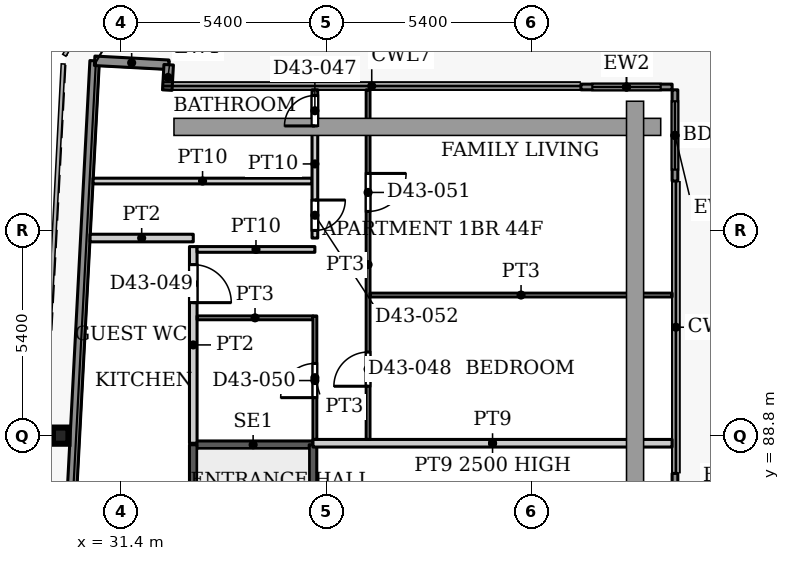
"""IFC4 building model, lengths in metres.
Left out: names, types, materials, properties, quantities, classifications, styles, units other than length and angle.
Written with IfcOpenShell. Run it as: python <this file> out.ifc"""

import sys

from ifc_helpers import new_model, si_unit, direction, frame, frame_2d, origin, origin_2d, place, context, subcontext, project, spatial, rectangle, i_section, extrude, source, transform, mapped, element, fill, save


model = new_model("IFC4")
c1 = context("Model", 3, precision=1e-05, world=origin(), true_north=direction((0.0, 1.0)))
c2 = subcontext(c1, "Body", "Model", "MODEL_VIEW")
j1 = project(units=[si_unit("LENGTHUNIT", "METRE"), si_unit("PLANEANGLEUNIT", "RADIAN")], contexts=[c1])
p1 = place(None, origin())
s1 = spatial("IfcSite", under=j1, at=p1, CompositionType="ELEMENT")
p2 = place(p1, origin())
s2 = spatial("IfcBuilding", under=s1, at=p2, CompositionType="ELEMENT")
p3 = place(p2, frame((0.0, 0.0, 187.7)))
s3 = spatial("IfcBuildingStorey", under=s2, at=p3, CompositionType="ELEMENT", Elevation=187.7)
p4 = place(p3, frame((29.811, 88.8, 0.0), z_axis=(0.0, 0.0, 1.0), x_axis=(1.0, 0.0, 0.0)))
e1 = element("IfcColumn", 1, at=p4, inside=s3, PredefinedType="COLUMN", context=c2, shape_type="SweptSolid", body=[
    extrude(i_section(OverallWidth=0.409, OverallDepth=0.425, WebThickness=0.033, FlangeThickness=0.052, FilletRadius=0.013, at=origin_2d()), origin(), (0.0, 0.0, 1.0), 3.9),
])
p5 = place(p3, frame((27.195, 31.969, 0.0), z_axis=(0.0, 0.0, 1.0), x_axis=(0.052554995867, 0.998618031286, 0.0)))
e2 = element("IfcWall", 2, at=p5, inside=s3, PredefinedType="SOLIDWALL", context=c2, shape_type="SweptSolid", body=[
    extrude(rectangle(XDim=66.787, YDim=0.25, at=frame_2d((33.394, 0.0))), origin(), (0.0, 0.0, 1.0), 3.75),
])
p6 = place(p3, frame((30.705, 98.664, 0.0), z_axis=(0.0, 0.0, 1.0), x_axis=(0.998577785791, -0.053314216913, 0.0)))
e3 = element("IfcWall", 3, at=p6, inside=s3, PredefinedType="SOLIDWALL", context=c2, shape_type="SweptSolid", body=[
    extrude(rectangle(XDim=1.951, YDim=0.25, at=frame_2d((0.975, 0.0))), origin(), (0.0, 0.0, 1.0), 3.75),
])
p7 = place(p3, frame((32.653, 98.56, 0.0), z_axis=(0.0, 0.0, 1.0), x_axis=(-0.054093451632, -0.998535877418, 0.0)))
e4 = element("IfcWall", 4, at=p7, inside=s3, PredefinedType="SOLIDWALL", context=c2, shape_type="SweptSolid", body=[
    extrude(rectangle(XDim=0.668, YDim=0.25, at=frame_2d((0.334, 0.0))), origin(), (0.0, 0.0, 1.0), 3.75),
])
p8 = place(p3, frame((43.5, 97.975, 0.0), z_axis=(0.0, 0.0, 1.0), x_axis=(1.0, 0.0, 0.0)))
e5 = element("IfcWall", 5, at=p8, inside=s3, PredefinedType="SOLIDWALL", context=c2, shape_type="SweptSolid", body=[
    extrude(rectangle(XDim=2.4, YDim=0.15, at=frame_2d((1.2, 0.0))), origin(), (0.0, 0.0, 1.0), 3.75),
])
p9 = place(p8, frame((0.3, 0.0, 0.0)))
e6 = element("IfcOpeningElement", 6, at=p9, cuts=e5, PredefinedType="OPENING", context=c2, shape_type="SweptSolid", body=[
    extrude(rectangle(XDim=1.8, YDim=2.4, at=frame_2d((0.9, 1.2))), frame((0.0, 0.085, 0.0), z_axis=(0.0, -1.0, 0.0), x_axis=(1.0, 0.0, 0.0)), (0.0, 0.0, 1.0), 0.17),
])
p10 = place(p3, frame((45.975, 97.9, 0.0), z_axis=(0.0, 0.0, 1.0), x_axis=(0.0, -1.0, 0.0)))
e7 = element("IfcWall", 7, at=p10, inside=s3, PredefinedType="SOLIDWALL", context=c2, shape_type="SweptSolid", body=[
    extrude(rectangle(XDim=2.4, YDim=0.15, at=frame_2d((1.2, 0.0))), origin(), (0.0, 0.0, 1.0), 3.75),
])
p11 = place(p10, frame((0.3, 0.0, 0.0)))
e8 = element("IfcOpeningElement", 8, at=p11, cuts=e7, PredefinedType="OPENING", context=c2, shape_type="SweptSolid", body=[
    extrude(rectangle(XDim=1.8, YDim=2.4, at=frame_2d((0.9, 1.2))), frame((0.0, 0.085, 0.0), z_axis=(0.0, -1.0, 0.0), x_axis=(1.0, 0.0, 0.0)), (0.0, 0.0, 1.0), 0.17),
])
p12 = place(p3, frame((45.975, 87.806, 0.0), z_axis=(0.0, 0.0, 1.0), x_axis=(0.0, -1.0, 0.0)))
e9 = element("IfcWall", 9, at=p12, inside=s3, PredefinedType="SOLIDWALL", context=c2, shape_type="SweptSolid", body=[
    extrude(rectangle(XDim=2.4, YDim=0.15, at=frame_2d((1.2, 0.0))), origin(), (0.0, 0.0, 1.0), 3.75),
])
p13 = place(p12, frame((0.3, 0.0, 0.0)))
e10 = element("IfcOpeningElement", 10, at=p13, cuts=e9, PredefinedType="OPENING", context=c2, shape_type="SweptSolid", body=[
    extrude(rectangle(XDim=1.8, YDim=2.4, at=frame_2d((0.9, 1.2))), frame((0.0, 0.085, 0.0), z_axis=(0.0, -1.0, 0.0), x_axis=(1.0, 0.0, 0.0)), (0.0, 0.0, 1.0), 0.17),
])
p14 = place(p3, frame((33.3, 88.56, 0.0), z_axis=(0.0, 0.0, 1.0), x_axis=(1.0, 0.0, 0.0)))
e11 = element("IfcWall", 11, at=p14, inside=s3, PredefinedType="SHEAR", context=c2, shape_type="SweptSolid", body=[
    extrude(rectangle(XDim=3.15, YDim=0.2, at=frame_2d((1.575, 0.0))), origin(), (0.0, 0.0, 1.0), 3.9),
])
p15 = place(p3, frame((33.3, 79.4, 0.0), z_axis=(0.0, 0.0, 1.0), x_axis=(0.0, 1.0, 0.0)))
e12 = element("IfcWall", 12, at=p15, inside=s3, PredefinedType="SHEAR", context=c2, shape_type="SweptSolid", body=[
    extrude(rectangle(XDim=9.16, YDim=0.2, at=frame_2d((4.58, 0.0))), origin(), (0.0, 0.0, 1.0), 3.9),
])
p16 = place(p15, frame((0.35, 0.0, 0.0)))
e13 = element("IfcOpeningElement", 13, at=p16, cuts=e12, PredefinedType="OPENING", context=c2, shape_type="SweptSolid", body=[
    extrude(rectangle(XDim=1.1, YDim=2.2, at=frame_2d((0.55, 1.1))), frame((0.0, 0.11, 0.0), z_axis=(0.0, -1.0, 0.0), x_axis=(1.0, 0.0, 0.0)), (0.0, 0.0, 1.0), 0.22),
])
p17 = place(p3, frame((36.45, 79.4, 0.0), z_axis=(0.0, 0.0, 1.0), x_axis=(0.0, 1.0, 0.0)))
e14 = element("IfcWall", 14, at=p17, inside=s3, PredefinedType="SHEAR", context=c2, shape_type="SweptSolid", body=[
    extrude(rectangle(XDim=9.16, YDim=0.2, at=frame_2d((4.58, 0.0))), origin(), (0.0, 0.0, 1.0), 3.9),
])
p18 = place(p3, frame((30.664, 95.5, 0.0), z_axis=(0.0, 0.0, 1.0), x_axis=(1.0, 0.0, 0.0)))
e15 = element("IfcWall", 15, at=p18, inside=s3, PredefinedType="PARTITIONING", context=c2, shape_type="SweptSolid", body=[
    extrude(rectangle(XDim=5.761, YDim=0.15, at=frame_2d((2.88, 0.0))), origin(), (0.0, 0.0, 1.0), 3.6),
])
p19 = place(p3, frame((30.585, 94.0, 0.0), z_axis=(0.0, 0.0, 1.0), x_axis=(1.0, 0.0, 0.0)))
e16 = element("IfcWall", 16, at=p19, inside=s3, PredefinedType="PARTITIONING", context=c2, shape_type="SweptSolid", body=[
    extrude(rectangle(XDim=2.715, YDim=0.2, at=frame_2d((1.358, 0.0))), origin(), (0.0, 0.0, 1.0), 3.6),
])
p20 = place(p3, frame((33.3, 88.6, 0.0), z_axis=(0.0, 0.0, 1.0), x_axis=(0.0, 1.0, 0.0)))
e17 = element("IfcWall", 17, at=p20, inside=s3, PredefinedType="PARTITIONING", context=c2, shape_type="SweptSolid", body=[
    extrude(rectangle(XDim=5.175, YDim=0.2, at=frame_2d((2.587, 0.0))), origin(), (0.0, 0.0, 1.0), 3.6),
])
p21 = place(p20, frame((3.7, 0.0, 0.0)))
e18 = element("IfcOpeningElement", 18, at=p21, cuts=e17, PredefinedType="OPENING", context=c2, shape_type="SweptSolid", body=[
    extrude(rectangle(XDim=1.0, YDim=2.1, at=frame_2d((0.5, 1.05))), frame((0.0, 0.11, 0.0), z_axis=(0.0, -1.0, 0.0), x_axis=(1.0, 0.0, 0.0)), (0.0, 0.0, 1.0), 0.22),
])
p22 = place(p3, frame((33.4, 91.9, 0.0), z_axis=(0.0, 0.0, 1.0), x_axis=(1.0, 0.0, 0.0)))
e19 = element("IfcWall", 19, at=p22, inside=s3, PredefinedType="PARTITIONING", context=c2, shape_type="SweptSolid", body=[
    extrude(rectangle(XDim=3.05, YDim=0.1, at=frame_2d((1.525, 0.0))), origin(), (0.0, 0.0, 1.0), 3.6),
])
p23 = place(p3, frame((33.4, 93.7, 0.0), z_axis=(0.0, 0.0, 1.0), x_axis=(1.0, 0.0, 0.0)))
e20 = element("IfcWall", 20, at=p23, inside=s3, PredefinedType="PARTITIONING", context=c2, shape_type="SweptSolid", body=[
    extrude(rectangle(XDim=3.1, YDim=0.15, at=frame_2d((1.55, 0.0))), origin(), (0.0, 0.0, 1.0), 3.6),
])
p24 = place(p3, frame((36.45, 88.6, 0.0), z_axis=(0.0, 0.0, 1.0), x_axis=(1.0, 0.0, 0.0)))
e21 = element("IfcWall", 21, at=p24, inside=s3, PredefinedType="PARTITIONING", context=c2, shape_type="SweptSolid", body=[
    extrude(rectangle(XDim=9.45, YDim=0.2, at=frame_2d((4.725, 0.0))), origin(), (0.0, 0.0, 1.0), 2.5),
])
p25 = place(p3, frame((36.5, 88.7, 0.0), z_axis=(0.0, 0.0, 1.0), x_axis=(0.0, 1.0, 0.0)))
e22 = element("IfcWall", 22, at=p25, inside=s3, PredefinedType="PARTITIONING", context=c2, shape_type="SweptSolid", body=[
    extrude(rectangle(XDim=3.25, YDim=0.1, at=frame_2d((1.625, 0.0))), origin(), (0.0, 0.0, 1.0), 3.6),
])
p26 = place(p25, frame((1.1, 0.0, 0.0)))
e23 = element("IfcOpeningElement", 23, at=p26, cuts=e22, PredefinedType="OPENING", context=c2, shape_type="SweptSolid", body=[
    extrude(rectangle(XDim=0.9, YDim=2.1, at=frame_2d((0.45, 1.05))), frame((0.0, 0.06, 0.0), z_axis=(0.0, -1.0, 0.0), x_axis=(1.0, 0.0, 0.0)), (0.0, 0.0, 1.0), 0.12),
])
p27 = place(p3, frame((36.5, 94.0, 0.0), z_axis=(0.0, 0.0, 1.0), x_axis=(0.0, 1.0, 0.0)))
e24 = element("IfcWall", 24, at=p27, inside=s3, PredefinedType="PARTITIONING", context=c2, shape_type="SweptSolid", body=[
    extrude(rectangle(XDim=3.9, YDim=0.15, at=frame_2d((1.95, 0.0))), origin(), (0.0, 0.0, 1.0), 3.6),
])
p28 = place(p27, frame((2.95, 0.0, 0.0)))
e25 = element("IfcOpeningElement", 25, at=p28, cuts=e24, PredefinedType="OPENING", context=c2, shape_type="SweptSolid", body=[
    extrude(rectangle(XDim=0.8, YDim=2.1, at=frame_2d((0.4, 1.05))), frame((0.0, 0.085, 0.0), z_axis=(0.0, -1.0, 0.0), x_axis=(1.0, 0.0, 0.0)), (0.0, 0.0, 1.0), 0.17),
])
p29 = place(p27, frame((0.2, 0.0, 0.0)))
e26 = element("IfcOpeningElement", 26, at=p29, cuts=e24, PredefinedType="OPENING", context=c2, shape_type="SweptSolid", body=[
    extrude(rectangle(XDim=0.8, YDim=2.1, at=frame_2d((0.4, 1.05))), frame((0.0, 0.085, 0.0), z_axis=(0.0, -1.0, 0.0), x_axis=(1.0, 0.0, 0.0)), (0.0, 0.0, 1.0), 0.17),
])
p30 = place(p3, frame((37.9, 88.7, 0.0), z_axis=(0.0, 0.0, 1.0), x_axis=(0.0, 1.0, 0.0)))
e27 = element("IfcWall", 27, at=p30, inside=s3, PredefinedType="PARTITIONING", context=c2, shape_type="SweptSolid", body=[
    extrude(rectangle(XDim=9.2, YDim=0.1, at=frame_2d((4.6, 0.0))), origin(), (0.0, 0.0, 1.0), 3.6),
])
p31 = place(p30, frame((1.4, 0.0, 0.0)))
e28 = element("IfcOpeningElement", 28, at=p31, cuts=e27, PredefinedType="OPENING", context=c2, shape_type="SweptSolid", body=[
    extrude(rectangle(XDim=0.9, YDim=2.1, at=frame_2d((0.45, 1.05))), frame((0.0, 0.06, 0.0), z_axis=(0.0, -1.0, 0.0), x_axis=(1.0, 0.0, 0.0)), (0.0, 0.0, 1.0), 0.12),
])
p32 = place(p30, frame((6.0, 0.0, 0.0)))
e29 = element("IfcOpeningElement", 29, at=p32, cuts=e27, PredefinedType="OPENING", context=c2, shape_type="SweptSolid", body=[
    extrude(rectangle(XDim=1.0, YDim=2.1, at=frame_2d((0.5, 1.05))), frame((0.0, 0.06, 0.0), z_axis=(0.0, -1.0, 0.0), x_axis=(1.0, 0.0, 0.0)), (0.0, 0.0, 1.0), 0.12),
])
p33 = place(p3, frame((37.95, 92.5, 0.0), z_axis=(0.0, 0.0, 1.0), x_axis=(1.0, 0.0, 0.0)))
e30 = element("IfcWall", 30, at=p33, inside=s3, PredefinedType="PARTITIONING", context=c2, shape_type="SweptSolid", body=[
    extrude(rectangle(XDim=7.95, YDim=0.1, at=frame_2d((3.975, 0.0))), origin(), (0.0, 0.0, 1.0), 3.6),
])
m1 = source(origin(), c2, "Body", "SweptSolid", [
    extrude(rectangle(XDim=1.8, YDim=2.4, at=frame_2d((0.9, 1.2))), frame((0.0, 0.025, 0.0), z_axis=(0.0, -1.0, 0.0), x_axis=(1.0, 0.0, 0.0)), (0.0, 0.0, 1.0), 0.05),
])
p34 = place(p9, origin())
e31 = element("IfcDoor", 31, at=p34, inside=s3, OperationType="SLIDING_TO_LEFT", PredefinedType="DOOR", context=c2, shape_type="MappedRepresentation", body=[
    mapped(m1, transform((0.0, 0.0, 0.0), x_axis=(1.0, 0.0, 0.0), y_axis=(0.0, 1.0, 0.0), z_axis=(0.0, 0.0, 1.0), scale=1.0)),
])
fill(e6, e31)
p35 = place(p11, origin())
e32 = element("IfcDoor", 32, at=p35, inside=s3, OperationType="SLIDING_TO_LEFT", PredefinedType="DOOR", context=c2, shape_type="MappedRepresentation", body=[
    mapped(m1, transform((0.0, 0.0, 0.0), x_axis=(1.0, 0.0, 0.0), y_axis=(0.0, 1.0, 0.0), z_axis=(0.0, 0.0, 1.0), scale=1.0)),
])
fill(e8, e32)
m2 = source(origin(), c2, "Body", "SweptSolid", [
    extrude(rectangle(XDim=0.8, YDim=2.1, at=frame_2d((0.4, 1.05))), frame((0.0, 0.025, 0.0), z_axis=(0.0, -1.0, 0.0), x_axis=(1.0, 0.0, 0.0)), (0.0, 0.0, 1.0), 0.05),
])
p36 = place(p28, origin())
e33 = element("IfcDoor", 33, at=p36, inside=s3, OperationType="SINGLE_SWING_LEFT", PredefinedType="DOOR", context=c2, shape_type="MappedRepresentation", body=[
    mapped(m2, transform((0.0, 0.0, 0.0), x_axis=(1.0, 0.0, 0.0), y_axis=(0.0, 1.0, 0.0), z_axis=(0.0, 0.0, 1.0), scale=1.0)),
])
fill(e25, e33)
m3 = source(origin(), c2, "Body", "SweptSolid", [
    extrude(rectangle(XDim=0.9, YDim=2.1, at=frame_2d((0.45, 1.05))), frame((0.0, 0.025, 0.0), z_axis=(0.0, -1.0, 0.0), x_axis=(1.0, 0.0, 0.0)), (0.0, 0.0, 1.0), 0.05),
])
p37 = place(p31, origin())
e34 = element("IfcDoor", 34, at=p37, inside=s3, OperationType="SINGLE_SWING_LEFT", PredefinedType="DOOR", context=c2, shape_type="MappedRepresentation", body=[
    mapped(m3, transform((0.0, 0.0, 0.0), x_axis=(1.0, 0.0, 0.0), y_axis=(0.0, 1.0, 0.0), z_axis=(0.0, 0.0, 1.0), scale=1.0)),
])
fill(e28, e34)
m4 = source(origin(), c2, "Body", "SweptSolid", [
    extrude(rectangle(XDim=1.0, YDim=2.1, at=frame_2d((0.5, 1.05))), frame((0.0, 0.025, 0.0), z_axis=(0.0, -1.0, 0.0), x_axis=(1.0, 0.0, 0.0)), (0.0, 0.0, 1.0), 0.05),
])
p38 = place(p21, origin())
e35 = element("IfcDoor", 35, at=p38, inside=s3, OperationType="SINGLE_SWING_RIGHT", PredefinedType="DOOR", context=c2, shape_type="MappedRepresentation", body=[
    mapped(m4, transform((0.0, 0.0, 0.0), x_axis=(1.0, 0.0, 0.0), y_axis=(0.0, 1.0, 0.0), z_axis=(0.0, 0.0, 1.0), scale=1.0)),
])
fill(e18, e35)
p39 = place(p26, origin())
e36 = element("IfcDoor", 36, at=p39, inside=s3, OperationType="SINGLE_SWING_LEFT", PredefinedType="DOOR", context=c2, shape_type="MappedRepresentation", body=[
    mapped(m3, transform((0.0, 0.0, 0.0), x_axis=(1.0, 0.0, 0.0), y_axis=(0.0, 1.0, 0.0), z_axis=(0.0, 0.0, 1.0), scale=1.0)),
])
fill(e23, e36)
m5 = source(origin(), c2, "Body", "SweptSolid", [
    extrude(rectangle(XDim=1.0, YDim=2.1, at=frame_2d((0.5, 1.05))), frame((0.0, 0.025, 0.0), z_axis=(0.0, -1.0, 0.0), x_axis=(1.0, 0.0, 0.0)), (0.0, 0.0, 1.0), 0.05),
])
p40 = place(p32, origin())
e37 = element("IfcDoor", 37, at=p40, inside=s3, OperationType="SINGLE_SWING_RIGHT", PredefinedType="DOOR", context=c2, shape_type="MappedRepresentation", body=[
    mapped(m5, transform((0.0, 0.0, 0.0), x_axis=(1.0, 0.0, 0.0), y_axis=(0.0, 1.0, 0.0), z_axis=(0.0, 0.0, 1.0), scale=1.0)),
])
fill(e29, e37)
p41 = place(p29, origin())
e38 = element("IfcDoor", 38, at=p41, inside=s3, OperationType="SINGLE_SWING_RIGHT", PredefinedType="DOOR", context=c2, shape_type="MappedRepresentation", body=[
    mapped(m2, transform((0.0, 0.0, 0.0), x_axis=(1.0, 0.0, 0.0), y_axis=(0.0, 1.0, 0.0), z_axis=(0.0, 0.0, 1.0), scale=1.0)),
])
fill(e26, e38)
save(model, sys.argv[1])
